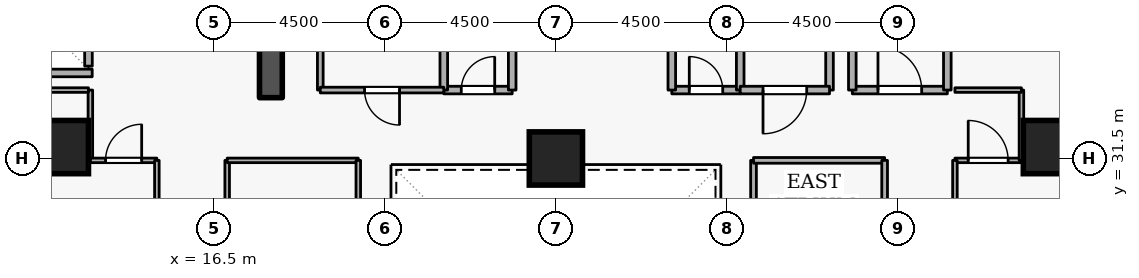
"""IFC4 building model, lengths in metres.
Left out: names, types, materials, properties, quantities, classifications, styles, units other than length and angle.
Written with IfcOpenShell. Run it as: python <this file> out.ifc"""

import sys

from ifc_helpers import new_model, si_unit, direction, frame, frame_2d, origin, origin_2d, place, context, subcontext, project, spatial, rectangle, extrude, element, fill, save


model = new_model("IFC4")
c1 = context("Model", 3, precision=1e-05, world=origin(), true_north=direction((0.0, 1.0)))
c2 = subcontext(c1, "Body", "Model", "MODEL_VIEW")
j1 = project(units=[si_unit("LENGTHUNIT", "METRE"), si_unit("PLANEANGLEUNIT", "RADIAN")], contexts=[c1])
p1 = place(None, origin())
s1 = spatial("IfcSite", under=j1, at=p1, CompositionType="ELEMENT")
p2 = place(p1, origin())
s2 = spatial("IfcBuilding", under=s1, at=p2, CompositionType="ELEMENT")
p3 = place(p2, frame((0.0, 0.0, 64.5)))
s3 = spatial("IfcBuildingStorey", under=s2, at=p3, CompositionType="ELEMENT", Elevation=64.5)
p4 = place(p3, frame((18.0, 33.1, 0.0), z_axis=(0.0, 0.0, 1.0), x_axis=(0.0, 1.0, 0.0)))
e1 = element("IfcWall", 1, at=p4, inside=s3, PredefinedType="SHEAR", context=c2, shape_type="SweptSolid", body=[
    extrude(rectangle(XDim=5.7, YDim=0.6, at=frame_2d((2.85, 0.0))), origin(), (0.0, 0.0, 1.0), 3.6),
])
for number, where, z_axis, x_axis in (
    (2, (12.5, 31.8, 0.0), (0.0, 0.0, 1.0), (1.0, 0.0, 0.0)),
    (3, (38.5, 31.8, 0.0), (0.0, 0.0, 1.0), (1.0, 0.0, 0.0)),
    (4, (25.5, 31.5, 0.0), (0.0, 0.0, 1.0), (1.0, 0.0, 0.0)),
):
    element("IfcColumn", number, at=place(p3, frame(where, z_axis=z_axis, x_axis=x_axis)), inside=s3, PredefinedType="COLUMN", context=c2, shape_type="SweptSolid", body=[
        extrude(rectangle(XDim=1.4, YDim=1.4, at=origin_2d()), origin(), (0.0, 0.0, 1.0), 3.6),
    ])
p5 = place(p3, frame((13.2, 33.93, 0.0), z_axis=(0.0, 0.0, 1.0), x_axis=(0.0, 1.0, 0.0)))
e5 = element("IfcWall", 5, at=p5, inside=s3, PredefinedType="STANDARD", context=c2, shape_type="SweptSolid", body=[
    extrude(rectangle(XDim=1.94, YDim=0.2, at=frame_2d((0.97, 0.0))), origin(), (0.0, 0.0, 1.0), 3.34),
])
p6 = place(p3, frame((11.002, 33.75, 0.0), z_axis=(0.0, 0.0, 1.0), x_axis=(1.0, 0.0, 0.0)))
e6 = element("IfcWall", 6, at=p6, inside=s3, PredefinedType="STANDARD", context=c2, shape_type="SweptSolid", body=[
    extrude(rectangle(XDim=2.296, YDim=0.2, at=frame_2d((1.148, 0.0))), origin(), (0.0, 0.0, 1.0), 3.34),
])
p7 = place(p3, frame((33.3, 33.3, 0.0), z_axis=(0.0, 0.0, 1.0), x_axis=(1.0, 0.0, 0.0)))
e7 = element("IfcWall", 7, at=p7, inside=s3, PredefinedType="STANDARD", context=c2, shape_type="SweptSolid", body=[
    extrude(rectangle(XDim=2.5, YDim=0.2, at=frame_2d((1.25, 0.0))), origin(), (0.0, 0.0, 1.0), 3.34),
])
p8 = place(p7, frame((0.675, 0.0, 0.0)))
e8 = element("IfcOpeningElement", 8, at=p8, cuts=e7, PredefinedType="OPENING", context=c2, shape_type="SweptSolid", body=[
    extrude(rectangle(XDim=1.15, YDim=2.1, at=frame_2d((0.575, 1.05))), frame((0.0, 0.11, 0.0), z_axis=(0.0, -1.0, 0.0), x_axis=(1.0, 0.0, 0.0)), (0.0, 0.0, 1.0), 0.22),
])
p9 = place(p3, frame((35.8, 33.3, 0.0), z_axis=(0.0, 0.0, 1.0), x_axis=(0.0, 1.0, 0.0)))
e9 = element("IfcWall", 9, at=p9, inside=s3, PredefinedType="STANDARD", context=c2, shape_type="SweptSolid", body=[
    extrude(rectangle(XDim=5.7, YDim=0.2, at=frame_2d((2.85, 0.0))), origin(), (0.0, 0.0, 1.0), 3.34),
])
p10 = place(p3, frame((33.3, 35.6, 0.0), z_axis=(0.0, 0.0, 1.0), x_axis=(0.0, -1.0, 0.0)))
e10 = element("IfcWall", 10, at=p10, inside=s3, PredefinedType="STANDARD", context=c2, shape_type="SweptSolid", body=[
    extrude(rectangle(XDim=2.3, YDim=0.2, at=frame_2d((1.15, 0.0))), origin(), (0.0, 0.0, 1.0), 2.545),
])
p11 = place(p3, frame((22.55, 33.3, 0.0), z_axis=(0.0, 0.0, 1.0), x_axis=(1.0, 0.0, 0.0)))
e11 = element("IfcWall", 11, at=p11, inside=s3, PredefinedType="STANDARD", context=c2, shape_type="SweptSolid", body=[
    extrude(rectangle(XDim=1.8, YDim=0.2, at=frame_2d((0.9, 0.0))), origin(), (0.0, 0.0, 1.0), 3.34),
])
p12 = place(p11, frame((0.46, 0.0, 0.0)))
e12 = element("IfcOpeningElement", 12, at=p12, cuts=e11, PredefinedType="OPENING", context=c2, shape_type="SweptSolid", body=[
    extrude(rectangle(XDim=0.88, YDim=2.04, at=frame_2d((0.44, 1.02))), frame((0.0, 0.11, 0.0), z_axis=(0.0, -1.0, 0.0), x_axis=(1.0, 0.0, 0.0)), (0.0, 0.0, 1.0), 0.22),
])
for number, where, z_axis, x_axis in (
    (13, (24.35, 33.3, 0.0), (0.0, 0.0, 1.0), (0.0, 1.0, 0.0)),
    (14, (22.55, 35.35, 0.0), (0.0, 0.0, 1.0), (0.0, -1.0, 0.0)),
):
    element("IfcWall", number, at=place(p3, frame(where, z_axis=z_axis, x_axis=x_axis)), inside=s3, PredefinedType="STANDARD", context=c2, shape_type="SweptSolid", body=[
        extrude(rectangle(XDim=2.05, YDim=0.2, at=frame_2d((1.025, 0.0))), origin(), (0.0, 0.0, 1.0), 3.34),
    ])
p13 = place(p3, frame((28.55, 33.3, 0.0), z_axis=(0.0, 0.0, 1.0), x_axis=(1.0, 0.0, 0.0)))
e15 = element("IfcWall", 15, at=p13, inside=s3, PredefinedType="STANDARD", context=c2, shape_type="SweptSolid", body=[
    extrude(rectangle(XDim=1.8, YDim=0.2, at=frame_2d((0.9, 0.0))), origin(), (0.0, 0.0, 1.0), 3.34),
])
p14 = place(p13, frame((0.46, 0.0, 0.0)))
e16 = element("IfcOpeningElement", 16, at=p14, cuts=e15, PredefinedType="OPENING", context=c2, shape_type="SweptSolid", body=[
    extrude(rectangle(XDim=0.88, YDim=2.04, at=frame_2d((0.44, 1.02))), frame((0.0, 0.11, 0.0), z_axis=(0.0, -1.0, 0.0), x_axis=(1.0, 0.0, 0.0)), (0.0, 0.0, 1.0), 0.22),
])
for number, where, z_axis, x_axis in (
    (17, (30.35, 33.3, 0.0), (0.0, 0.0, 1.0), (0.0, 1.0, 0.0)),
    (18, (28.55, 35.35, 0.0), (0.0, 0.0, 1.0), (0.0, -1.0, 0.0)),
):
    element("IfcWall", number, at=place(p3, frame(where, z_axis=z_axis, x_axis=x_axis)), inside=s3, PredefinedType="STANDARD", context=c2, shape_type="SweptSolid", body=[
        extrude(rectangle(XDim=2.05, YDim=0.2, at=frame_2d((1.025, 0.0))), origin(), (0.0, 0.0, 1.0), 3.34),
    ])
p15 = place(p3, frame((32.7, 35.35, 0.0), z_axis=(0.0, 0.0, 1.0), x_axis=(0.0, -1.0, 0.0)))
e19 = element("IfcWall", 19, at=p15, inside=s3, PredefinedType="STANDARD", context=c2, shape_type="SweptSolid", body=[
    extrude(rectangle(XDim=2.05, YDim=0.2, at=frame_2d((1.025, 0.0))), origin(), (0.0, 0.0, 1.0), 2.545),
])
p16 = place(p3, frame((32.7, 33.3, 0.0), z_axis=(0.0, 0.0, 1.0), x_axis=(-1.0, 0.0, 0.0)))
e20 = element("IfcWall", 20, at=p16, inside=s3, PredefinedType="STANDARD", context=c2, shape_type="SweptSolid", body=[
    extrude(rectangle(XDim=2.35, YDim=0.2, at=frame_2d((1.175, 0.0))), origin(), (0.0, 0.0, 1.0), 3.34),
])
p17 = place(p16, frame((0.6, 0.0, 0.0)))
e21 = element("IfcOpeningElement", 21, at=p17, cuts=e20, PredefinedType="OPENING", context=c2, shape_type="SweptSolid", body=[
    extrude(rectangle(XDim=1.15, YDim=2.1, at=frame_2d((0.575, 1.05))), frame((0.0, 0.11, 0.0), z_axis=(0.0, -1.0, 0.0), x_axis=(1.0, 0.0, 0.0)), (0.0, 0.0, 1.0), 0.22),
])
p18 = place(p3, frame((19.3, 33.3, 0.0), z_axis=(0.0, 0.0, 1.0), x_axis=(0.0, 1.0, 0.0)))
e22 = element("IfcWall", 22, at=p18, inside=s3, PredefinedType="PARTITIONING", context=c2, shape_type="SweptSolid", body=[
    extrude(rectangle(XDim=2.05, YDim=0.15, at=frame_2d((1.025, 0.0))), origin(), (0.0, 0.0, 1.0), 3.34),
])
p19 = place(p3, frame((22.55, 33.3, 0.0), z_axis=(0.0, 0.0, 1.0), x_axis=(-1.0, 0.0, 0.0)))
e23 = element("IfcWall", 23, at=p19, inside=s3, PredefinedType="PARTITIONING", context=c2, shape_type="SweptSolid", body=[
    extrude(rectangle(XDim=3.25, YDim=0.15, at=frame_2d((1.625, 0.0))), origin(), (0.0, 0.0, 1.0), 3.34),
])
p20 = place(p19, frame((1.165, 0.0, 0.0)))
e24 = element("IfcOpeningElement", 24, at=p20, cuts=e23, PredefinedType="OPENING", context=c2, shape_type="SweptSolid", body=[
    extrude(rectangle(XDim=0.92, YDim=2.08, at=frame_2d((0.46, 1.04))), frame((0.0, 0.085, 0.0), z_axis=(0.0, -1.0, 0.0), x_axis=(1.0, 0.0, 0.0)), (0.0, 0.0, 1.0), 0.17),
])
p21 = place(p3, frame((13.25, 33.3, 0.0), z_axis=(0.0, 0.0, 1.0), x_axis=(0.0, -1.0, 0.0)))
e25 = element("IfcWall", 25, at=p21, inside=s3, PredefinedType="PARTITIONING", context=c2, shape_type="SweptSolid", body=[
    extrude(rectangle(XDim=1.85, YDim=0.12, at=frame_2d((0.925, 0.0))), origin(), (0.0, 0.0, 1.0), 3.34),
])
p22 = place(p3, frame((13.25, 31.45, 0.0), z_axis=(0.0, 0.0, 1.0), x_axis=(1.0, 0.0, 0.0)))
e26 = element("IfcWall", 26, at=p22, inside=s3, PredefinedType="PARTITIONING", context=c2, shape_type="SweptSolid", body=[
    extrude(rectangle(XDim=1.75, YDim=0.12, at=frame_2d((0.875, 0.0))), origin(), (0.0, 0.0, 1.0), 3.34),
])
p23 = place(p22, frame((0.4, 0.0, 0.0)))
e27 = element("IfcOpeningElement", 27, at=p23, cuts=e26, PredefinedType="OPENING", context=c2, shape_type="SweptSolid", body=[
    extrude(rectangle(XDim=0.95, YDim=2.1, at=frame_2d((0.475, 1.05))), frame((0.0, 0.07, 0.0), z_axis=(0.0, -1.0, 0.0), x_axis=(1.0, 0.0, 0.0)), (0.0, 0.0, 1.0), 0.14),
])
p24 = place(p3, frame((15.0, 31.45, 0.0), z_axis=(0.0, 0.0, 1.0), x_axis=(0.0, -1.0, 0.0)))
e28 = element("IfcWall", 28, at=p24, inside=s3, PredefinedType="PARTITIONING", context=c2, shape_type="SweptSolid", body=[
    extrude(rectangle(XDim=1.3, YDim=0.12, at=frame_2d((0.65, 0.0))), origin(), (0.0, 0.0, 1.0), 3.34),
])
p25 = place(p3, frame((10.9, 33.3, 0.0), z_axis=(0.0, 0.0, 1.0), x_axis=(1.0, 0.0, 0.0)))
e29 = element("IfcWall", 29, at=p25, inside=s3, PredefinedType="PARTITIONING", context=c2, shape_type="SweptSolid", body=[
    extrude(rectangle(XDim=2.3, YDim=0.12, at=frame_2d((1.15, 0.0))), origin(), (0.0, 0.0, 1.0), 3.34),
])
p26 = place(p3, frame((36.0, 31.45, 0.0), z_axis=(0.0, 0.0, 1.0), x_axis=(1.0, 0.0, 0.0)))
e30 = element("IfcWall", 30, at=p26, inside=s3, PredefinedType="PARTITIONING", context=c2, shape_type="SweptSolid", body=[
    extrude(rectangle(XDim=1.75, YDim=0.12, at=frame_2d((0.875, 0.0))), origin(), (0.0, 0.0, 1.0), 3.34),
])
p27 = place(p26, frame((0.35, 0.0, 0.0)))
e31 = element("IfcOpeningElement", 31, at=p27, cuts=e30, PredefinedType="OPENING", context=c2, shape_type="SweptSolid", body=[
    extrude(rectangle(XDim=1.05, YDim=2.1, at=frame_2d((0.525, 1.05))), frame((0.0, 0.07, 0.0), z_axis=(0.0, -1.0, 0.0), x_axis=(1.0, 0.0, 0.0)), (0.0, 0.0, 1.0), 0.14),
])
p28 = place(p3, frame((37.75, 31.45, 0.0), z_axis=(0.0, 0.0, 1.0), x_axis=(0.0, 1.0, 0.0)))
e32 = element("IfcWall", 32, at=p28, inside=s3, PredefinedType="PARTITIONING", context=c2, shape_type="SweptSolid", body=[
    extrude(rectangle(XDim=1.85, YDim=0.12, at=frame_2d((0.925, 0.0))), origin(), (0.0, 0.0, 1.0), 3.34),
])
p29 = place(p3, frame((37.75, 33.3, 0.0), z_axis=(0.0, 0.0, 1.0), x_axis=(-1.0, 0.0, 0.0)))
e33 = element("IfcWall", 33, at=p29, inside=s3, PredefinedType="PARTITIONING", context=c2, shape_type="SweptSolid", body=[
    extrude(rectangle(XDim=1.75, YDim=0.12, at=frame_2d((0.875, 0.0))), origin(), (0.0, 0.0, 1.0), 3.34),
])
p30 = place(p3, frame((36.0, 30.15, 0.0), z_axis=(0.0, 0.0, 1.0), x_axis=(0.0, 1.0, 0.0)))
e34 = element("IfcWall", 34, at=p30, inside=s3, PredefinedType="PARTITIONING", context=c2, shape_type="SweptSolid", body=[
    extrude(rectangle(XDim=1.3, YDim=0.12, at=frame_2d((0.65, 0.0))), origin(), (0.0, 0.0, 1.0), 3.34),
])
p31 = place(p3, frame((30.7, 22.55, 0.0), z_axis=(0.0, 0.0, 1.0), x_axis=(0.0, 1.0, 0.0)))
e35 = element("IfcWall", 35, at=p31, inside=s3, PredefinedType="PARTITIONING", context=c2, shape_type="SweptSolid", body=[
    extrude(rectangle(XDim=8.9, YDim=0.15, at=frame_2d((4.45, 0.0))), origin(), (0.0, 0.0, 1.0), 3.34),
])
p32 = place(p3, frame((30.7, 31.45, 0.0), z_axis=(0.0, 0.0, 1.0), x_axis=(1.0, 0.0, 0.0)))
e36 = element("IfcWall", 36, at=p32, inside=s3, PredefinedType="PARTITIONING", context=c2, shape_type="SweptSolid", body=[
    extrude(rectangle(XDim=3.45, YDim=0.15, at=frame_2d((1.725, 0.0))), origin(), (0.0, 0.0, 1.0), 3.34),
])
p33 = place(p3, frame((34.15, 31.45, 0.0), z_axis=(0.0, 0.0, 1.0), x_axis=(0.0, -1.0, 0.0)))
e37 = element("IfcWall", 37, at=p33, inside=s3, PredefinedType="PARTITIONING", context=c2, shape_type="SweptSolid", body=[
    extrude(rectangle(XDim=8.9, YDim=0.15, at=frame_2d((4.45, 0.0))), origin(), (0.0, 0.0, 1.0), 3.34),
])
p34 = place(p33, frame((3.8, 0.0, 0.0)))
e38 = element("IfcOpeningElement", 38, at=p34, cuts=e37, PredefinedType="OPENING", context=c2, shape_type="SweptSolid", body=[
    extrude(rectangle(XDim=1.3, YDim=2.12, at=frame_2d((0.65, 1.06))), frame((0.0, 0.085, 0.0), z_axis=(0.0, -1.0, 0.0), x_axis=(1.0, 0.0, 0.0)), (0.0, 0.0, 1.0), 0.17),
])
p35 = place(p3, frame((16.85, 22.55, 0.0), z_axis=(0.0, 0.0, 1.0), x_axis=(0.0, 1.0, 0.0)))
e39 = element("IfcWall", 39, at=p35, inside=s3, PredefinedType="PARTITIONING", context=c2, shape_type="SweptSolid", body=[
    extrude(rectangle(XDim=8.9, YDim=0.12, at=frame_2d((4.45, 0.0))), origin(), (0.0, 0.0, 1.0), 3.34),
])
p36 = place(p35, frame((3.975, 0.0, 0.0)))
e40 = element("IfcOpeningElement", 40, at=p36, cuts=e39, PredefinedType="OPENING", context=c2, shape_type="SweptSolid", body=[
    extrude(rectangle(XDim=0.95, YDim=2.1, at=frame_2d((0.475, 1.05))), frame((0.0, 0.07, 0.0), z_axis=(0.0, -1.0, 0.0), x_axis=(1.0, 0.0, 0.0)), (0.0, 0.0, 1.0), 0.14),
])
p37 = place(p3, frame((16.85, 31.45, 0.0), z_axis=(0.0, 0.0, 1.0), x_axis=(1.0, 0.0, 0.0)))
e41 = element("IfcWall", 41, at=p37, inside=s3, PredefinedType="PARTITIONING", context=c2, shape_type="SweptSolid", body=[
    extrude(rectangle(XDim=3.45, YDim=0.12, at=frame_2d((1.725, 0.0))), origin(), (0.0, 0.0, 1.0), 3.34),
])
p38 = place(p3, frame((20.3, 31.45, 0.0), z_axis=(0.0, 0.0, 1.0), x_axis=(0.0, -1.0, 0.0)))
e42 = element("IfcWall", 42, at=p38, inside=s3, PredefinedType="PARTITIONING", context=c2, shape_type="SweptSolid", body=[
    extrude(rectangle(XDim=8.9, YDim=0.12, at=frame_2d((4.45, 0.0))), origin(), (0.0, 0.0, 1.0), 3.34),
])
p39 = place(p8, origin())
e43 = element("IfcDoor", 43, at=p39, inside=s3, OperationType="SINGLE_SWING_LEFT", PredefinedType="DOOR", context=c2, shape_type="SweptSolid", body=[
    extrude(rectangle(XDim=1.15, YDim=2.1, at=frame_2d((0.575, 1.05))), frame((0.0, 0.025, 0.0), z_axis=(0.0, -1.0, 0.0), x_axis=(1.0, 0.0, 0.0)), (0.0, 0.0, 1.0), 0.05),
])
fill(e8, e43)
p40 = place(p12, origin())
e44 = element("IfcDoor", 44, at=p40, inside=s3, OperationType="SINGLE_SWING_RIGHT", PredefinedType="DOOR", context=c2, shape_type="SweptSolid", body=[
    extrude(rectangle(XDim=0.88, YDim=2.04, at=frame_2d((0.44, 1.02))), frame((0.0, 0.025, 0.0), z_axis=(0.0, -1.0, 0.0), x_axis=(1.0, 0.0, 0.0)), (0.0, 0.0, 1.0), 0.05),
])
fill(e12, e44)
p41 = place(p14, origin())
e45 = element("IfcDoor", 45, at=p41, inside=s3, OperationType="SINGLE_SWING_LEFT", PredefinedType="DOOR", context=c2, shape_type="SweptSolid", body=[
    extrude(rectangle(XDim=0.88, YDim=2.04, at=frame_2d((0.44, 1.02))), frame((0.0, 0.025, 0.0), z_axis=(0.0, -1.0, 0.0), x_axis=(1.0, 0.0, 0.0)), (0.0, 0.0, 1.0), 0.05),
])
fill(e16, e45)
p42 = place(p20, origin())
e46 = element("IfcDoor", 46, at=p42, inside=s3, OperationType="SINGLE_SWING_LEFT", PredefinedType="DOOR", context=c2, shape_type="SweptSolid", body=[
    extrude(rectangle(XDim=0.92, YDim=2.08, at=frame_2d((0.46, 1.04))), frame((0.0, 0.025, 0.0), z_axis=(0.0, -1.0, 0.0), x_axis=(1.0, 0.0, 0.0)), (0.0, 0.0, 1.0), 0.05),
])
fill(e24, e46)
p43 = place(p17, origin())
e47 = element("IfcDoor", 47, at=p43, inside=s3, OperationType="SINGLE_SWING_RIGHT", PredefinedType="DOOR", context=c2, shape_type="SweptSolid", body=[
    extrude(rectangle(XDim=1.15, YDim=2.1, at=frame_2d((0.575, 1.05))), frame((0.0, 0.025, 0.0), z_axis=(0.0, -1.0, 0.0), x_axis=(1.0, 0.0, 0.0)), (0.0, 0.0, 1.0), 0.05),
])
fill(e21, e47)
p44 = place(p23, origin())
e48 = element("IfcDoor", 48, at=p44, inside=s3, OperationType="SINGLE_SWING_RIGHT", PredefinedType="DOOR", context=c2, shape_type="SweptSolid", body=[
    extrude(rectangle(XDim=0.95, YDim=2.1, at=frame_2d((0.475, 1.05))), frame((0.0, 0.025, 0.0), z_axis=(0.0, -1.0, 0.0), x_axis=(1.0, 0.0, 0.0)), (0.0, 0.0, 1.0), 0.05),
])
fill(e27, e48)
p45 = place(p27, origin())
e49 = element("IfcDoor", 49, at=p45, inside=s3, OperationType="SINGLE_SWING_LEFT", PredefinedType="DOOR", context=c2, shape_type="SweptSolid", body=[
    extrude(rectangle(XDim=1.05, YDim=2.1, at=frame_2d((0.525, 1.05))), frame((0.0, 0.025, 0.0), z_axis=(0.0, -1.0, 0.0), x_axis=(1.0, 0.0, 0.0)), (0.0, 0.0, 1.0), 0.05),
])
fill(e31, e49)
save(model, sys.argv[1])
